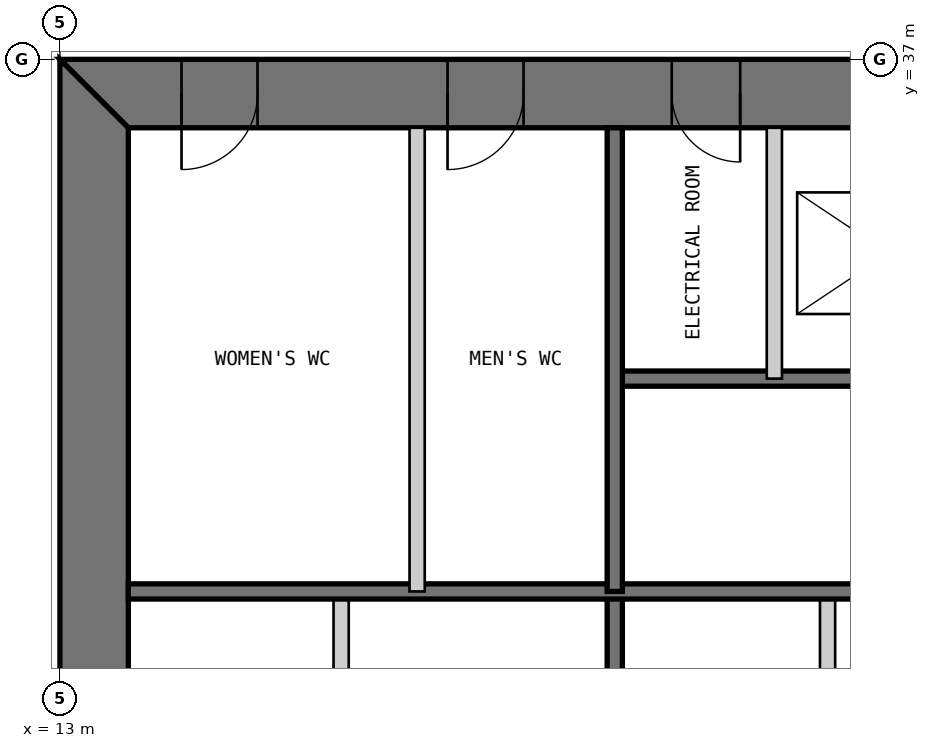
"""IFC4 building model, lengths in metres.
Left out: names, types, materials, properties, quantities, classifications, styles, units other than length and angle.
Written with IfcOpenShell. Run it as: python <this file> out.ifc"""

import sys

from ifc_helpers import new_model, si_unit, direction, frame, frame_2d, origin, place, context, subcontext, project, spatial, polyline, rectangle, outline, extrude, element, fill, save


model = new_model("IFC4")
c1 = context("Model", 3, precision=1e-05, world=origin(), true_north=direction((0.0, 1.0)))
c2 = subcontext(c1, "Body", "Model", "MODEL_VIEW")
j1 = project(units=[si_unit("LENGTHUNIT", "METRE"), si_unit("PLANEANGLEUNIT", "RADIAN")], contexts=[c1])
p1 = place(None, origin())
s1 = spatial("IfcSite", under=j1, at=p1, CompositionType="ELEMENT")
p2 = place(p1, origin())
s2 = spatial("IfcBuilding", under=s1, at=p2, CompositionType="ELEMENT")
p3 = place(p2, frame((0.0, 0.0, 266.2)))
s3 = spatial("IfcBuildingStorey", under=s2, at=p3, CompositionType="ELEMENT", Elevation=266.2)
p4 = place(p3, frame((37.0, 36.55, 0.0), z_axis=(0.0, 0.0, 1.0), x_axis=(-1.0, 0.0, 0.0)))
e1 = element("IfcWall", 1, at=p4, inside=s3, PredefinedType="SHEAR", context=c2, shape_type="SweptSolid", body=[
    extrude(outline(polyline([(0.0, -0.45), (24.0, -0.45), (23.1, 0.45), (0.9, 0.45), (0.0, -0.45)])), origin(), (0.0, 0.0, 1.0), 3.4),
])
p5 = place(p4, frame((4.9, 0.0, 0.0)))
e2 = element("IfcOpeningElement", 2, at=p5, cuts=e1, PredefinedType="OPENING", context=c2, shape_type="SweptSolid", body=[
    extrude(rectangle(XDim=1.0, YDim=2.2, at=frame_2d((0.5, 1.1))), frame((0.0, 0.46, 0.0), z_axis=(0.0, -1.0, 0.0), x_axis=(1.0, 0.0, 0.0)), (0.0, 0.0, 1.0), 0.92),
])
p6 = place(p4, frame((8.9, 0.0, 0.0)))
e3 = element("IfcOpeningElement", 3, at=p6, cuts=e1, PredefinedType="OPENING", context=c2, shape_type="SweptSolid", body=[
    extrude(rectangle(XDim=1.1, YDim=2.2, at=frame_2d((0.55, 1.1))), frame((0.0, 0.46, 0.0), z_axis=(0.0, -1.0, 0.0), x_axis=(1.0, 0.0, 0.0)), (0.0, 0.0, 1.0), 0.92),
])
p7 = place(p4, frame((15.05, 0.0, 0.0)))
e4 = element("IfcOpeningElement", 4, at=p7, cuts=e1, PredefinedType="OPENING", context=c2, shape_type="SweptSolid", body=[
    extrude(rectangle(XDim=0.9, YDim=2.2, at=frame_2d((0.45, 1.1))), frame((0.0, 0.46, 0.0), z_axis=(0.0, -1.0, 0.0), x_axis=(1.0, 0.0, 0.0)), (0.0, 0.0, 1.0), 0.92),
])
p8 = place(p4, frame((17.9, 0.0, 0.0)))
e5 = element("IfcOpeningElement", 5, at=p8, cuts=e1, PredefinedType="OPENING", context=c2, shape_type="SweptSolid", body=[
    extrude(rectangle(XDim=1.0, YDim=2.2, at=frame_2d((0.5, 1.1))), frame((0.0, 0.46, 0.0), z_axis=(0.0, -1.0, 0.0), x_axis=(1.0, 0.0, 0.0)), (0.0, 0.0, 1.0), 0.92),
])
p9 = place(p4, frame((21.4, 0.0, 0.0)))
e6 = element("IfcOpeningElement", 6, at=p9, cuts=e1, PredefinedType="OPENING", context=c2, shape_type="SweptSolid", body=[
    extrude(rectangle(XDim=1.0, YDim=2.2, at=frame_2d((0.5, 1.1))), frame((0.0, 0.46, 0.0), z_axis=(0.0, -1.0, 0.0), x_axis=(1.0, 0.0, 0.0)), (0.0, 0.0, 1.0), 0.92),
])
p10 = place(p3, frame((13.45, 36.1, 0.0), z_axis=(0.0, 0.0, 1.0), x_axis=(0.0, -1.0, 0.0)))
e7 = element("IfcWall", 7, at=p10, inside=s3, PredefinedType="SHEAR", context=c2, shape_type="SweptSolid", body=[
    extrude(outline(polyline([(-0.9, -0.45), (23.1, -0.45), (22.2, 0.45), (0.0, 0.45), (-0.9, -0.45)])), origin(), (0.0, 0.0, 1.0), 3.4),
])
p11 = place(p10, frame((20.2, 0.0, 0.0)))
e8 = element("IfcOpeningElement", 8, at=p11, cuts=e7, PredefinedType="OPENING", context=c2, shape_type="SweptSolid", body=[
    extrude(rectangle(XDim=1.0, YDim=2.2, at=frame_2d((0.5, 1.1))), frame((0.0, 0.46, 0.0), z_axis=(0.0, -1.0, 0.0), x_axis=(1.0, 0.0, 0.0)), (0.0, 0.0, 1.0), 0.92),
])
p12 = place(p10, frame((17.25, 0.0, 0.0)))
e9 = element("IfcOpeningElement", 9, at=p12, cuts=e7, PredefinedType="OPENING", context=c2, shape_type="SweptSolid", body=[
    extrude(rectangle(XDim=0.9, YDim=2.2, at=frame_2d((0.45, 1.1))), frame((0.0, 0.46, 0.0), z_axis=(0.0, -1.0, 0.0), x_axis=(1.0, 0.0, 0.0)), (0.0, 0.0, 1.0), 0.92),
])
p13 = place(p3, frame((16.7, 13.9, 0.0), z_axis=(0.0, 0.0, 1.0), x_axis=(0.0, 1.0, 0.0)))
e10 = element("IfcWall", 10, at=p13, inside=s3, PredefinedType="PARTITIONING", context=c2, shape_type="SweptSolid", body=[
    extrude(rectangle(XDim=16.1, YDim=0.2, at=frame_2d((8.05, 0.0))), origin(), (0.0, 0.0, 1.0), 3.2),
])
p14 = place(p13, frame((7.95, 0.0, 0.0)))
e11 = element("IfcOpeningElement", 11, at=p14, cuts=e10, PredefinedType="OPENING", context=c2, shape_type="SweptSolid", body=[
    extrude(rectangle(XDim=0.9, YDim=2.2, at=frame_2d((0.45, 1.1))), frame((0.0, 0.11, 0.0), z_axis=(0.0, -1.0, 0.0), x_axis=(1.0, 0.0, 0.0)), (0.0, 0.0, 1.0), 0.22),
])
p15 = place(p13, frame((13.3, 0.0, 0.0)))
e12 = element("IfcOpeningElement", 12, at=p15, cuts=e10, PredefinedType="OPENING", context=c2, shape_type="SweptSolid", body=[
    extrude(rectangle(XDim=0.9, YDim=2.2, at=frame_2d((0.45, 1.1))), frame((0.0, 0.11, 0.0), z_axis=(0.0, -1.0, 0.0), x_axis=(1.0, 0.0, 0.0)), (0.0, 0.0, 1.0), 0.22),
])
p16 = place(p3, frame((20.3, 13.9, 0.0), z_axis=(0.0, 0.0, 1.0), x_axis=(0.0, 1.0, 0.0)))
e13 = element("IfcWall", 13, at=p16, inside=s3, PredefinedType="SOLIDWALL", context=c2, shape_type="SweptSolid", body=[
    extrude(rectangle(XDim=16.1, YDim=0.2, at=frame_2d((8.05, 0.0))), origin(), (0.0, 0.0, 1.0), 3.2),
])
p17 = place(p16, frame((10.65, 0.0, 0.0)))
e14 = element("IfcOpeningElement", 14, at=p17, cuts=e13, PredefinedType="OPENING", context=c2, shape_type="SweptSolid", body=[
    extrude(rectangle(XDim=0.9, YDim=2.2, at=frame_2d((0.45, 1.1))), frame((0.0, 0.11, 0.0), z_axis=(0.0, -1.0, 0.0), x_axis=(1.0, 0.0, 0.0)), (0.0, 0.0, 1.0), 0.22),
])
p18 = place(p3, frame((23.1, 20.0, 0.0), z_axis=(0.0, 0.0, 1.0), x_axis=(0.0, 1.0, 0.0)))
e15 = element("IfcWall", 15, at=p18, inside=s3, PredefinedType="PARTITIONING", context=c2, shape_type="SweptSolid", body=[
    extrude(rectangle(XDim=10.0, YDim=0.2, at=frame_2d((5.0, 0.0))), origin(), (0.0, 0.0, 1.0), 3.2),
])
p19 = place(p3, frame((29.7, 32.8, 0.0), z_axis=(0.0, 0.0, 1.0), x_axis=(-1.0, 0.0, 0.0)))
e16 = element("IfcWall", 16, at=p19, inside=s3, PredefinedType="SOLIDWALL", context=c2, shape_type="SweptSolid", body=[
    extrude(rectangle(XDim=9.4, YDim=0.2, at=frame_2d((4.7, 0.0))), origin(), (0.0, 0.0, 1.0), 3.2),
])
p20 = place(p19, frame((0.25, 0.0, 0.0)))
e17 = element("IfcOpeningElement", 17, at=p20, cuts=e16, PredefinedType="OPENING", context=c2, shape_type="SweptSolid", body=[
    extrude(rectangle(XDim=1.0, YDim=2.2, at=frame_2d((0.5, 1.1))), frame((0.0, 0.11, 0.0), z_axis=(0.0, -1.0, 0.0), x_axis=(1.0, 0.0, 0.0)), (0.0, 0.0, 1.0), 0.22),
])
p21 = place(p3, frame((29.7, 30.0, 0.0), z_axis=(0.0, 0.0, 1.0), x_axis=(-1.0, 0.0, 0.0)))
e18 = element("IfcWall", 18, at=p21, inside=s3, PredefinedType="SOLIDWALL", context=c2, shape_type="SweptSolid", body=[
    extrude(rectangle(XDim=15.8, YDim=0.2, at=frame_2d((7.9, 0.0))), origin(), (0.0, 0.0, 1.0), 3.2),
])
p22 = place(p3, frame((22.4, 36.1, 0.0), z_axis=(0.0, 0.0, 1.0), x_axis=(0.0, -1.0, 0.0)))
e19 = element("IfcWall", 19, at=p22, inside=s3, PredefinedType="PARTITIONING", context=c2, shape_type="SweptSolid", body=[
    extrude(rectangle(XDim=3.3, YDim=0.2, at=frame_2d((1.65, 0.0))), origin(), (0.0, 0.0, 1.0), 3.2),
])
p23 = place(p3, frame((20.3, 36.1, 0.0), z_axis=(0.0, 0.0, 1.0), x_axis=(0.0, -1.0, 0.0)))
e20 = element("IfcWall", 20, at=p23, inside=s3, PredefinedType="SOLIDWALL", context=c2, shape_type="SweptSolid", body=[
    extrude(rectangle(XDim=6.1, YDim=0.2, at=frame_2d((3.05, 0.0))), origin(), (0.0, 0.0, 1.0), 3.2),
])
p24 = place(p3, frame((17.7, 36.1, 0.0), z_axis=(0.0, 0.0, 1.0), x_axis=(0.0, -1.0, 0.0)))
e21 = element("IfcWall", 21, at=p24, inside=s3, PredefinedType="PARTITIONING", context=c2, shape_type="SweptSolid", body=[
    extrude(rectangle(XDim=6.1, YDim=0.2, at=frame_2d((3.05, 0.0))), origin(), (0.0, 0.0, 1.0), 3.2),
])
p25 = place(p7, origin())
e22 = element("IfcDoor", 22, at=p25, inside=s3, OperationType="SINGLE_SWING_LEFT", PredefinedType="DOOR", context=c2, shape_type="SweptSolid", body=[
    extrude(rectangle(XDim=0.9, YDim=2.2, at=frame_2d((0.45, 1.1))), frame((0.0, 0.025, 0.0), z_axis=(0.0, -1.0, 0.0), x_axis=(1.0, 0.0, 0.0)), (0.0, 0.0, 1.0), 0.05),
    extrude(outline(polyline([(0.0, 0.0), (0.04, 0.0), (0.04, 2.16), (0.86, 2.16), (0.86, 0.0), (0.9, 0.0), (0.9, 2.2), (0.0, 2.2), (0.0, 0.0)])), frame((0.0, 0.3, 0.0), z_axis=(0.0, -1.0, 0.0), x_axis=(1.0, 0.0, 0.0)), (0.0, 0.0, 1.0), 0.6),
])
fill(e4, e22)
p26 = place(p8, origin())
e23 = element("IfcDoor", 23, at=p26, inside=s3, OperationType="SINGLE_SWING_RIGHT", PredefinedType="DOOR", context=c2, shape_type="SweptSolid", body=[
    extrude(rectangle(XDim=1.0, YDim=2.2, at=frame_2d((0.5, 1.1))), frame((0.0, 0.025, 0.0), z_axis=(0.0, -1.0, 0.0), x_axis=(1.0, 0.0, 0.0)), (0.0, 0.0, 1.0), 0.05),
    extrude(outline(polyline([(0.0, 0.0), (0.04, 0.0), (0.04, 2.16), (0.96, 2.16), (0.96, 0.0), (1.0, 0.0), (1.0, 2.2), (0.0, 2.2), (0.0, 0.0)])), frame((0.0, 0.3, 0.0), z_axis=(0.0, -1.0, 0.0), x_axis=(1.0, 0.0, 0.0)), (0.0, 0.0, 1.0), 0.6),
])
fill(e5, e23)
p27 = place(p9, origin())
e24 = element("IfcDoor", 24, at=p27, inside=s3, OperationType="SINGLE_SWING_RIGHT", PredefinedType="DOOR", context=c2, shape_type="SweptSolid", body=[
    extrude(rectangle(XDim=1.0, YDim=2.2, at=frame_2d((0.5, 1.1))), frame((0.0, 0.025, 0.0), z_axis=(0.0, -1.0, 0.0), x_axis=(1.0, 0.0, 0.0)), (0.0, 0.0, 1.0), 0.05),
    extrude(outline(polyline([(0.0, 0.0), (0.04, 0.0), (0.04, 2.16), (0.96, 2.16), (0.96, 0.0), (1.0, 0.0), (1.0, 2.2), (0.0, 2.2), (0.0, 0.0)])), frame((0.0, 0.3, 0.0), z_axis=(0.0, -1.0, 0.0), x_axis=(1.0, 0.0, 0.0)), (0.0, 0.0, 1.0), 0.6),
])
fill(e6, e24)
save(model, sys.argv[1])
